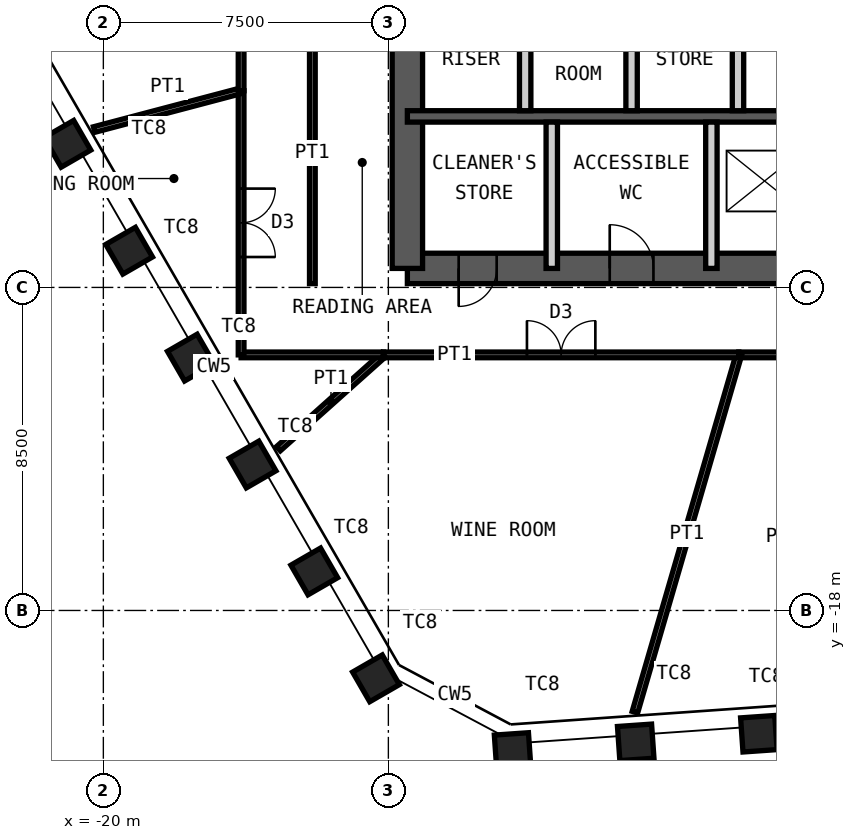
"""IFC4 building model, lengths in metres.
Left out: names, types, materials, properties, quantities, classifications, styles, units other than length and angle.
Written with IfcOpenShell. Run it as: python <this file> out.ifc"""

import sys

from ifc_helpers import new_model, si_unit, direction, frame, frame_2d, origin, origin_2d, place, context, subcontext, project, spatial, rectangle, hollow_rectangle, extrude, element, fill, save


model = new_model("IFC4")
c1 = context("Model", 3, precision=1e-05, world=origin(), true_north=direction((0.0, 1.0)))
c2 = subcontext(c1, "Body", "Model", "MODEL_VIEW")
j1 = project(units=[si_unit("LENGTHUNIT", "METRE"), si_unit("PLANEANGLEUNIT", "RADIAN")], contexts=[c1])
p1 = place(None, origin())
s1 = spatial("IfcSite", under=j1, at=p1, CompositionType="ELEMENT")
p2 = place(p1, origin())
s2 = spatial("IfcBuilding", under=s1, at=p2, CompositionType="ELEMENT")
p3 = place(p2, frame((0.0, 0.0, 320.8)))
s3 = spatial("IfcBuildingStorey", under=s2, at=p3, CompositionType="ELEMENT", Elevation=320.8)
for number, where, z_axis, x_axis in (
    (1, (-2.751, -21.244, 0.0), (0.0, 0.0, 1.0), (0.998, 0.07, 0.0)),
    (2, (-5.991, -21.47, 0.0), (0.0, 0.0, 1.0), (0.998, 0.07, 0.0)),
    (3, (-9.231, -21.697, 0.0), (0.0, 0.0, 1.0), (0.998, 0.07, 0.0)),
    (4, (-12.825, -19.786, 0.0), (0.0, 0.0, 1.0), (0.5, -0.866, 0.0)),
    (5, (-14.449, -16.973, 0.0), (0.0, 0.0, 1.0), (0.5, -0.866, 0.0)),
    (6, (-16.073, -14.16, 0.0), (0.0, 0.0, 1.0), (0.5, -0.866, 0.0)),
    (7, (-17.698, -11.347, 0.0), (0.0, 0.0, 1.0), (0.5, -0.866, 0.0)),
    (8, (-19.322, -8.534, 0.0), (0.0, 0.0, 1.0), (0.5, -0.866, 0.0)),
    (9, (-20.946, -5.721, 0.0), (0.0, 0.0, 1.0), (0.5, -0.866, 0.0)),
):
    element("IfcColumn", number, at=place(p3, frame(where, z_axis=z_axis, x_axis=x_axis)), inside=s3, PredefinedType="COLUMN", context=c2, shape_type="SweptSolid", body=[
        extrude(hollow_rectangle(XDim=0.9, YDim=0.9, WallThickness=0.05, at=origin_2d()), origin(), (0.0, 0.0, 1.0), 4.2),
    ])
p4 = place(p3, frame((-12.0, -9.0, 0.0), z_axis=(0.0, 0.0, 1.0), x_axis=(1.0, 0.0, 0.0)))
e10 = element("IfcWall", 10, at=p4, inside=s3, PredefinedType="SHEAR", context=c2, shape_type="SweptSolid", body=[
    extrude(rectangle(XDim=24.0, YDim=0.8, at=frame_2d((12.0, 0.0))), origin(), (0.0, 0.0, 1.0), 4.2),
])
p5 = place(p4, frame((1.35, 0.0, 0.0)))
e11 = element("IfcOpeningElement", 11, at=p5, cuts=e10, PredefinedType="OPENING", context=c2, shape_type="SweptSolid", body=[
    extrude(rectangle(XDim=1.0, YDim=2.1, at=frame_2d((0.5, 1.05))), frame((0.0, 0.41, 0.0), z_axis=(0.0, -1.0, 0.0), x_axis=(1.0, 0.0, 0.0)), (0.0, 0.0, 1.0), 0.82),
])
p6 = place(p4, frame((5.325, 0.0, 0.0)))
e12 = element("IfcOpeningElement", 12, at=p6, cuts=e10, PredefinedType="OPENING", context=c2, shape_type="SweptSolid", body=[
    extrude(rectangle(XDim=1.15, YDim=2.1, at=frame_2d((0.575, 1.05))), frame((0.0, 0.41, 0.0), z_axis=(0.0, -1.0, 0.0), x_axis=(1.0, 0.0, 0.0)), (0.0, 0.0, 1.0), 0.82),
])
p7 = place(p4, frame((12.6, 0.0, 0.0)))
e13 = element("IfcOpeningElement", 13, at=p7, cuts=e10, PredefinedType="OPENING", context=c2, shape_type="SweptSolid", body=[
    extrude(rectangle(XDim=1.0, YDim=2.1, at=frame_2d((0.5, 1.05))), frame((0.0, 0.41, 0.0), z_axis=(0.0, -1.0, 0.0), x_axis=(1.0, 0.0, 0.0)), (0.0, 0.0, 1.0), 0.82),
])
p8 = place(p3, frame((-12.0, -9.0, 0.0), z_axis=(0.0, 0.0, 1.0), x_axis=(0.0, 1.0, 0.0)))
e14 = element("IfcWall", 14, at=p8, inside=s3, PredefinedType="SHEAR", context=c2, shape_type="SweptSolid", body=[
    extrude(rectangle(XDim=18.0, YDim=0.8, at=frame_2d((9.0, 0.0))), origin(), (0.0, 0.0, 1.0), 4.2),
])
p9 = place(p8, frame((8.1, 0.0, 0.0)))
e15 = element("IfcOpeningElement", 15, at=p9, cuts=e14, PredefinedType="OPENING", context=c2, shape_type="SweptSolid", body=[
    extrude(rectangle(XDim=1.8, YDim=2.1, at=frame_2d((0.9, 1.05))), frame((0.0, 0.41, 0.0), z_axis=(0.0, -1.0, 0.0), x_axis=(1.0, 0.0, 0.0)), (0.0, 0.0, 1.0), 0.82),
])
p10 = place(p3, frame((-12.0, -5.0, 0.0), z_axis=(0.0, 0.0, 1.0), x_axis=(1.0, 0.0, 0.0)))
e16 = element("IfcWall", 16, at=p10, inside=s3, PredefinedType="SHEAR", context=c2, shape_type="SweptSolid", body=[
    extrude(rectangle(XDim=24.0, YDim=0.3, at=frame_2d((12.0, 0.0))), origin(), (0.0, 0.0, 1.0), 4.2),
])
for number, where, z_axis, x_axis in (
    (17, (-8.9, -4.85, 0.0), (0.0, 0.0, 1.0), (0.0, 1.0, 0.0)),
    (18, (-6.1, -4.85, 0.0), (0.0, 0.0, 1.0), (0.0, 1.0, 0.0)),
    (19, (-3.3, -4.85, 0.0), (0.0, 0.0, 1.0), (0.0, 1.0, 0.0)),
):
    element("IfcWall", number, at=place(p3, frame(where, z_axis=z_axis, x_axis=x_axis)), inside=s3, PredefinedType="PARTITIONING", context=c2, shape_type="SweptSolid", body=[
        extrude(rectangle(XDim=2.65, YDim=0.3, at=frame_2d((1.325, 0.0))), origin(), (0.0, 0.0, 1.0), 3.98),
    ])
for number, where, z_axis, x_axis in (
    (20, (-8.2, -9.0, 0.0), (0.0, 0.0, 1.0), (0.0, 1.0, 0.0)),
    (21, (-4.0, -9.0, 0.0), (0.0, 0.0, 1.0), (0.0, 1.0, 0.0)),
):
    element("IfcWall", number, at=place(p3, frame(where, z_axis=z_axis, x_axis=x_axis)), inside=s3, PredefinedType="PARTITIONING", context=c2, shape_type="SweptSolid", body=[
        extrude(rectangle(XDim=3.85, YDim=0.3, at=frame_2d((1.925, 0.0))), origin(), (0.0, 0.0, 1.0), 3.98),
    ])
p11 = place(p3, frame((3.928, -11.275, 0.0), z_axis=(0.0, 0.0, 1.0), x_axis=(-1.0, 0.0, 0.0)))
e22 = element("IfcWall", 22, at=p11, inside=s3, PredefinedType="PARTITIONING", context=c2, shape_type="SweptSolid", body=[
    extrude(rectangle(XDim=7.206, YDim=0.15, at=frame_2d((3.603, 0.0))), origin(), (0.0, 0.0, 1.0), 4.03),
])
p12 = place(p11, frame((2.703, 0.0, 0.0)))
e23 = element("IfcOpeningElement", 23, at=p12, cuts=e22, PredefinedType="OPENING", context=c2, shape_type="SweptSolid", body=[
    extrude(rectangle(XDim=1.8, YDim=2.4, at=frame_2d((0.9, 1.2))), frame((0.0, 0.085, 0.0), z_axis=(0.0, -1.0, 0.0), x_axis=(1.0, 0.0, 0.0)), (0.0, 0.0, 1.0), 0.17),
])
p13 = place(p3, frame((-6.012, -20.676, 0.0), z_axis=(0.0, 0.0, 1.0), x_axis=(0.279197441451, 0.960233715658, 0.0)))
e24 = element("IfcWall", 24, at=p13, inside=s3, PredefinedType="PARTITIONING", context=c2, shape_type="SweptSolid", body=[
    extrude(rectangle(XDim=9.79, YDim=0.15, at=frame_2d((4.895, 0.0))), origin(), (0.0, 0.0, 1.0), 3.33),
])
p14 = place(p3, frame((-3.279, -11.275, 0.0), z_axis=(0.0, 0.0, 1.0), x_axis=(-1.0, 0.0, 0.0)))
e25 = element("IfcWall", 25, at=p14, inside=s3, PredefinedType="PARTITIONING", context=c2, shape_type="SweptSolid", body=[
    extrude(rectangle(XDim=9.349, YDim=0.15, at=frame_2d((4.675, 0.0))), origin(), (0.0, 0.0, 1.0), 4.03),
])
p15 = place(p14, frame((3.775, 0.0, 0.0)))
e26 = element("IfcOpeningElement", 26, at=p15, cuts=e25, PredefinedType="OPENING", context=c2, shape_type="SweptSolid", body=[
    extrude(rectangle(XDim=1.8, YDim=2.4, at=frame_2d((0.9, 1.2))), frame((0.0, 0.085, 0.0), z_axis=(0.0, -1.0, 0.0), x_axis=(1.0, 0.0, 0.0)), (0.0, 0.0, 1.0), 0.17),
])
p16 = place(p3, frame((-15.393, -13.743, 0.0), z_axis=(0.0, 0.0, 1.0), x_axis=(0.745928311453, 0.666026241355, 0.0)))
e27 = element("IfcWall", 27, at=p16, inside=s3, PredefinedType="PARTITIONING", context=c2, shape_type="SweptSolid", body=[
    extrude(rectangle(XDim=3.706, YDim=0.15, at=frame_2d((1.853, 0.0))), origin(), (0.0, 0.0, 1.0), 3.33),
])
p17 = place(p3, frame((-12.628, -11.275, 0.0), z_axis=(0.0, 0.0, 1.0), x_axis=(-1.0, 0.0, 0.0)))
e28 = element("IfcWall", 28, at=p17, inside=s3, PredefinedType="PARTITIONING", context=c2, shape_type="SweptSolid", body=[
    extrude(rectangle(XDim=3.747, YDim=0.15, at=frame_2d((1.874, 0.0))), origin(), (0.0, 0.0, 1.0), 4.03),
])
p18 = place(p3, frame((-16.375, -11.275, 0.0), z_axis=(0.0, 0.0, 1.0), x_axis=(0.0, 1.0, 0.0)))
e29 = element("IfcWall", 29, at=p18, inside=s3, PredefinedType="PARTITIONING", context=c2, shape_type="SweptSolid", body=[
    extrude(rectangle(XDim=6.95, YDim=0.15, at=frame_2d((3.475, 0.0))), origin(), (0.0, 0.0, 1.0), 4.03),
])
p19 = place(p18, frame((2.575, 0.0, 0.0)))
e30 = element("IfcOpeningElement", 30, at=p19, cuts=e29, PredefinedType="OPENING", context=c2, shape_type="SweptSolid", body=[
    extrude(rectangle(XDim=1.8, YDim=2.4, at=frame_2d((0.9, 1.2))), frame((0.0, 0.085, 0.0), z_axis=(0.0, -1.0, 0.0), x_axis=(1.0, 0.0, 0.0)), (0.0, 0.0, 1.0), 0.17),
])
p20 = place(p3, frame((-20.243, -5.346, 0.0), z_axis=(0.0, 0.0, 1.0), x_axis=(0.966848057487, 0.255352371703, 0.0)))
e31 = element("IfcWall", 31, at=p20, inside=s3, PredefinedType="PARTITIONING", context=c2, shape_type="SweptSolid", body=[
    extrude(rectangle(XDim=4.0, YDim=0.15, at=frame_2d((2.0, 0.0))), origin(), (0.0, 0.0, 1.0), 3.33),
])
p21 = place(p3, frame((-16.375, -4.324, 0.0), z_axis=(0.0, 0.0, 1.0), x_axis=(0.0, 1.0, 0.0)))
e32 = element("IfcWall", 32, at=p21, inside=s3, PredefinedType="PARTITIONING", context=c2, shape_type="SweptSolid", body=[
    extrude(rectangle(XDim=7.446, YDim=0.15, at=frame_2d((3.723, 0.0))), origin(), (0.0, 0.0, 1.0), 4.03),
])
p22 = place(p21, frame((3.223, 0.0, 0.0)))
e33 = element("IfcOpeningElement", 33, at=p22, cuts=e32, PredefinedType="OPENING", context=c2, shape_type="SweptSolid", body=[
    extrude(rectangle(XDim=1.0, YDim=2.4, at=frame_2d((0.5, 1.2))), frame((0.0, 0.085, 0.0), z_axis=(0.0, -1.0, 0.0), x_axis=(1.0, 0.0, 0.0)), (0.0, 0.0, 1.0), 0.17),
])
p23 = place(p3, frame((-14.5, -9.4, 0.0), z_axis=(0.0, 0.0, 1.0), x_axis=(0.0, 1.0, 0.0)))
e34 = element("IfcWall", 34, at=p23, inside=s3, PredefinedType="PARTITIONING", context=c2, shape_type="SweptSolid", body=[
    extrude(rectangle(XDim=6.9, YDim=0.15, at=frame_2d((3.45, 0.0))), origin(), (0.0, 0.0, 1.0), 4.03),
])
p24 = place(p5, origin())
e35 = element("IfcDoor", 35, at=p24, inside=s3, OperationType="SINGLE_SWING_LEFT", PredefinedType="DOOR", context=c2, shape_type="SweptSolid", body=[
    extrude(rectangle(XDim=1.0, YDim=2.1, at=frame_2d((0.5, 1.05))), frame((0.0, 0.025, 0.0), z_axis=(0.0, -1.0, 0.0), x_axis=(1.0, 0.0, 0.0)), (0.0, 0.0, 1.0), 0.05),
])
fill(e11, e35)
p25 = place(p6, origin())
e36 = element("IfcDoor", 36, at=p25, inside=s3, OperationType="SINGLE_SWING_RIGHT", PredefinedType="DOOR", context=c2, shape_type="SweptSolid", body=[
    extrude(rectangle(XDim=1.15, YDim=2.1, at=frame_2d((0.575, 1.05))), frame((0.0, 0.025, 0.0), z_axis=(0.0, -1.0, 0.0), x_axis=(1.0, 0.0, 0.0)), (0.0, 0.0, 1.0), 0.05),
])
fill(e12, e36)
p26 = place(p15, origin())
e37 = element("IfcDoor", 37, at=p26, inside=s3, OperationType="DOUBLE_DOOR_DOUBLE_SWING", PredefinedType="DOOR", context=c2, shape_type="SweptSolid", body=[
    extrude(rectangle(XDim=1.8, YDim=2.4, at=frame_2d((0.9, 1.2))), frame((0.0, 0.025, 0.0), z_axis=(0.0, -1.0, 0.0), x_axis=(1.0, 0.0, 0.0)), (0.0, 0.0, 1.0), 0.05),
])
fill(e26, e37)
p27 = place(p19, origin())
e38 = element("IfcDoor", 38, at=p27, inside=s3, OperationType="DOUBLE_DOOR_DOUBLE_SWING", PredefinedType="DOOR", context=c2, shape_type="SweptSolid", body=[
    extrude(rectangle(XDim=1.8, YDim=2.4, at=frame_2d((0.9, 1.2))), frame((0.0, 0.025, 0.0), z_axis=(0.0, -1.0, 0.0), x_axis=(1.0, 0.0, 0.0)), (0.0, 0.0, 1.0), 0.05),
])
fill(e30, e38)
save(model, sys.argv[1])
